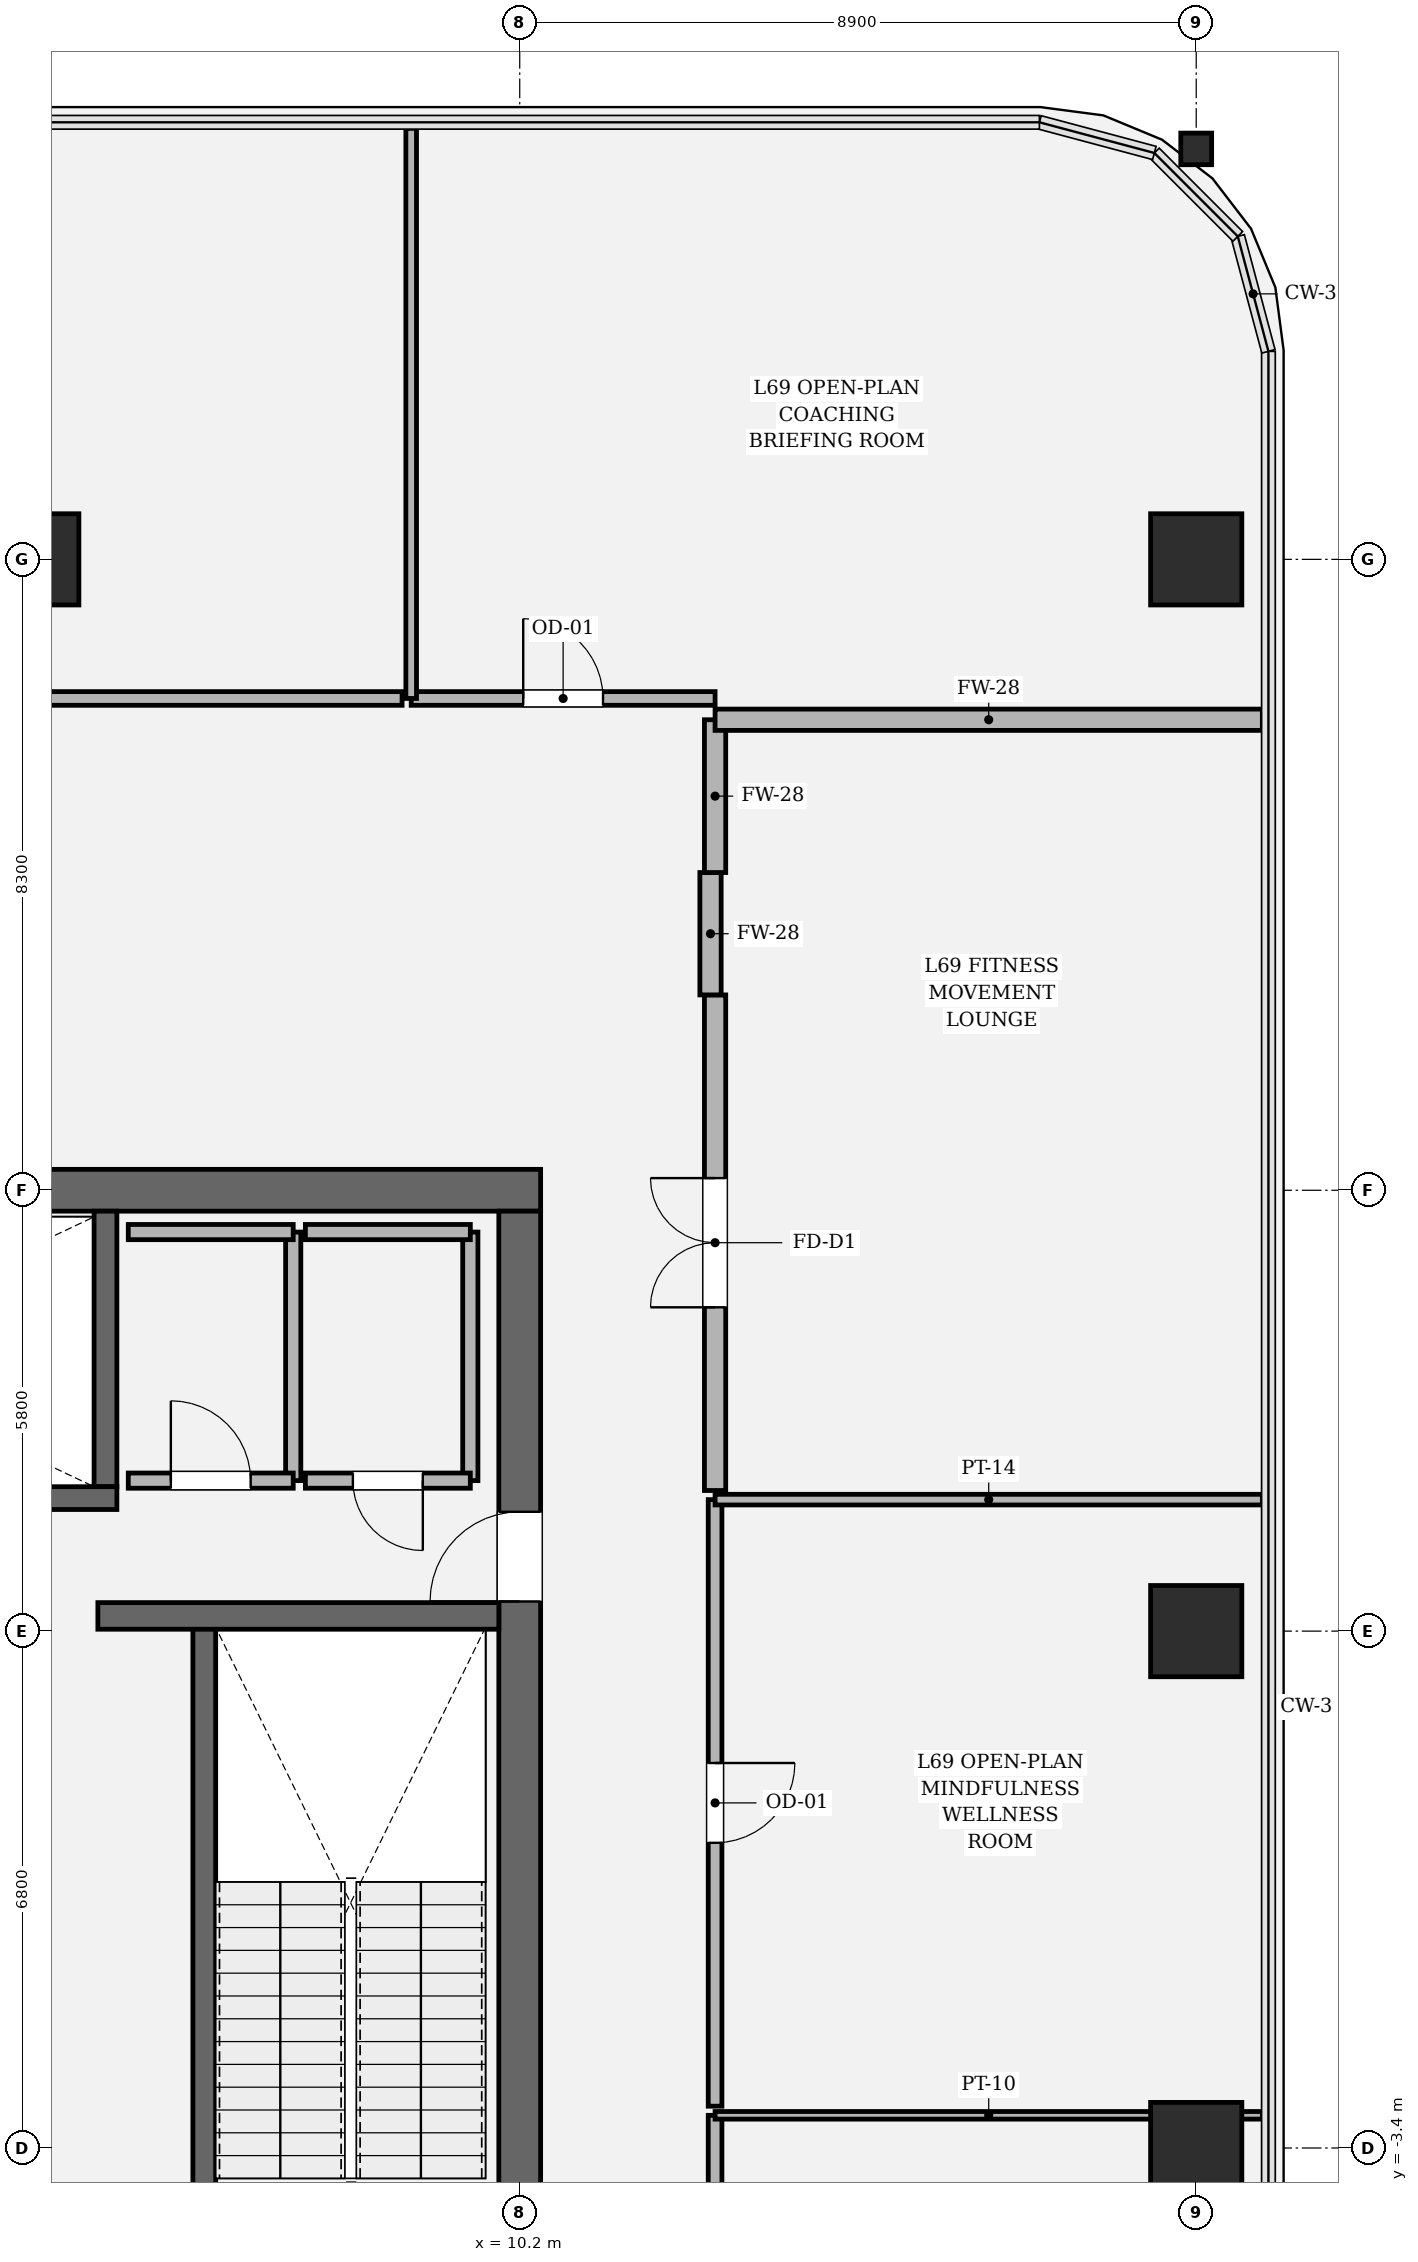
"""IFC4 building model, lengths in metres.
Left out: names, types, materials, properties, quantities, classifications, styles, units other than length and angle.
Written with IfcOpenShell. Run it as: python <this file> out.ifc"""

import sys

from ifc_helpers import new_model, si_unit, direction, frame, frame_2d, origin, origin_2d, place, context, subcontext, project, spatial, rectangle, hollow_rectangle, i_section, extrude, element, fill, save


model = new_model("IFC4")
c1 = context("Model", 3, precision=1e-05, world=origin(), true_north=direction((0.0, 1.0)))
c2 = subcontext(c1, "Body", "Model", "MODEL_VIEW")
j1 = project(units=[si_unit("LENGTHUNIT", "METRE"), si_unit("PLANEANGLEUNIT", "RADIAN")], contexts=[c1])
p1 = place(None, origin())
s1 = spatial("IfcSite", under=j1, at=p1, CompositionType="ELEMENT")
p2 = place(p1, origin())
s2 = spatial("IfcBuilding", under=s1, at=p2, CompositionType="ELEMENT")
p3 = place(p2, frame((0.0, 0.0, 292.2)))
s3 = spatial("IfcBuildingStorey", under=s2, at=p3, CompositionType="ELEMENT", Elevation=292.2)
p4 = place(p3, frame((-10.475, 9.2, 0.0), z_axis=(0.0, 0.0, 1.0), x_axis=(1.0, 0.0, 0.0)))
e1 = element("IfcWall", 1, at=p4, inside=s3, PredefinedType="SHEAR", context=c2, shape_type="SweptSolid", body=[
    extrude(rectangle(XDim=20.95, YDim=0.55, at=frame_2d((10.475, 0.0))), origin(), (0.0, 0.0, 1.0), 4.2),
])
p5 = place(p3, frame((10.2, 8.925, 0.0), z_axis=(0.0, 0.0, 1.0), x_axis=(0.0, -1.0, 0.0)))
e2 = element("IfcWall", 2, at=p5, inside=s3, PredefinedType="SHEAR", context=c2, shape_type="SweptSolid", body=[
    extrude(rectangle(XDim=17.85, YDim=0.55, at=frame_2d((8.925, 0.0))), origin(), (0.0, 0.0, 1.0), 4.2),
])
p6 = place(p5, frame((3.955, 0.0, 0.0)))
e3 = element("IfcOpeningElement", 3, at=p6, cuts=e2, PredefinedType="OPENING", context=c2, shape_type="SweptSolid", body=[
    extrude(rectangle(XDim=1.18, YDim=2.2, at=frame_2d((0.59, 1.1))), frame((0.0, 0.285, 0.0), z_axis=(0.0, -1.0, 0.0), x_axis=(1.0, 0.0, 0.0)), (0.0, 0.0, 1.0), 0.57),
])
p7 = place(p3, frame((6.05, 3.45, 0.0), z_axis=(0.0, 0.0, 1.0), x_axis=(0.0, -1.0, 0.0)))
e4 = element("IfcWall", 4, at=p7, inside=s3, PredefinedType="SOLIDWALL", context=c2, shape_type="SweptSolid", body=[
    extrude(rectangle(XDim=8.95, YDim=0.3, at=frame_2d((4.475, 0.0))), origin(), (0.0, 0.0, 1.0), 4.2),
])
p8 = place(p3, frame((4.75, 8.925, 0.0), z_axis=(0.0, 0.0, 1.0), x_axis=(0.0, -1.0, 0.0)))
e5 = element("IfcWall", 5, at=p8, inside=s3, PredefinedType="SOLIDWALL", context=c2, shape_type="SweptSolid", body=[
    extrude(rectangle(XDim=3.625, YDim=0.3, at=frame_2d((1.812, 0.0))), origin(), (0.0, 0.0, 1.0), 4.2),
])
p9 = place(p3, frame((-4.9, 5.15, 0.0), z_axis=(0.0, 0.0, 1.0), x_axis=(1.0, 0.0, 0.0)))
e6 = element("IfcWall", 6, at=p9, inside=s3, PredefinedType="SOLIDWALL", context=c2, shape_type="SweptSolid", body=[
    extrude(rectangle(XDim=9.8, YDim=0.3, at=frame_2d((4.9, 0.0))), origin(), (0.0, 0.0, 1.0), 4.2),
])
p10 = place(p9, frame((0.56, 0.0, 0.0)))
e7 = element("IfcOpeningElement", 7, at=p10, cuts=e6, PredefinedType="OPENING", context=c2, shape_type="SweptSolid", body=[
    extrude(rectangle(XDim=1.18, YDim=2.2, at=frame_2d((0.59, 1.1))), frame((0.0, 0.16, 0.0), z_axis=(0.0, -1.0, 0.0), x_axis=(1.0, 0.0, 0.0)), (0.0, 0.0, 1.0), 0.32),
])
p11 = place(p3, frame((4.65, 3.6, 0.0), z_axis=(0.0, 0.0, 1.0), x_axis=(1.0, 0.0, 0.0)))
e8 = element("IfcWall", 8, at=p11, inside=s3, PredefinedType="SOLIDWALL", context=c2, shape_type="SweptSolid", body=[
    extrude(rectangle(XDim=5.275, YDim=0.35, at=frame_2d((2.638, 0.0))), origin(), (0.0, 0.0, 1.0), 4.2),
])
for number, where, z_axis, x_axis in (
    (9, (19.1, -3.4, 0.0), (0.0, 0.0, 1.0), (1.0, 0.0, 0.0)),
    (10, (19.1, 3.4, 0.0), (0.0, 0.0, 1.0), (1.0, 0.0, 0.0)),
    (11, (19.1, 17.5, 0.0), (0.0, 0.0, 1.0), (1.0, 0.0, 0.0)),
    (12, (3.8, 17.5, 0.0), (0.0, 0.0, 1.0), (1.0, 0.0, 0.0)),
):
    element("IfcColumn", number, at=place(p3, frame(where, z_axis=z_axis, x_axis=x_axis)), inside=s3, PredefinedType="COLUMN", context=c2, shape_type="SweptSolid", body=[
        extrude(hollow_rectangle(XDim=1.2, YDim=1.2, WallThickness=0.035, at=origin_2d()), origin(), (0.0, 0.0, 1.0), 4.2),
    ])
p12 = place(p3, frame((19.1, 22.9, 0.0), z_axis=(0.0, 0.0, 1.0), x_axis=(1.0, 0.0, 0.0)))
e13 = element("IfcColumn", 13, at=p12, inside=s3, PredefinedType="COLUMN", context=c2, shape_type="SweptSolid", body=[
    extrude(i_section(OverallWidth=0.406, OverallDepth=0.416, WebThickness=0.029, FlangeThickness=0.048, FilletRadius=0.018, at=origin_2d()), origin(), (0.0, 0.0, 1.0), 4.198),
])
p13 = place(p3, frame((7.22, 5.38, 0.0), z_axis=(0.0, 0.0, 1.0), x_axis=(0.0, 1.0, 0.0)))
e14 = element("IfcWall", 14, at=p13, inside=s3, PredefinedType="SOLIDWALL", context=c2, shape_type="SweptSolid", body=[
    extrude(rectangle(XDim=3.27, YDim=0.2, at=frame_2d((1.635, 0.0))), origin(), (0.0, 0.0, 1.0), 4.0),
])
p14 = place(p3, frame((7.22, 8.65, 0.0), z_axis=(0.0, 0.0, 1.0), x_axis=(-1.0, 0.0, 0.0)))
e15 = element("IfcWall", 15, at=p14, inside=s3, PredefinedType="SOLIDWALL", context=c2, shape_type="SweptSolid", body=[
    extrude(rectangle(XDim=2.17, YDim=0.2, at=frame_2d((1.085, 0.0))), origin(), (0.0, 0.0, 1.0), 4.0),
])
p15 = place(p3, frame((5.05, 5.38, 0.0), z_axis=(0.0, 0.0, 1.0), x_axis=(1.0, 0.0, 0.0)))
e16 = element("IfcWall", 16, at=p15, inside=s3, PredefinedType="SOLIDWALL", context=c2, shape_type="SweptSolid", body=[
    extrude(rectangle(XDim=2.17, YDim=0.2, at=frame_2d((1.085, 0.0))), origin(), (0.0, 0.0, 1.0), 4.0),
])
p16 = place(p15, frame((0.56, 0.0, 0.0)))
e17 = element("IfcOpeningElement", 17, at=p16, cuts=e16, PredefinedType="OPENING", context=c2, shape_type="SweptSolid", body=[
    extrude(rectangle(XDim=1.05, YDim=2.2, at=frame_2d((0.525, 1.1))), frame((0.0, 0.11, 0.0), z_axis=(0.0, -1.0, 0.0), x_axis=(1.0, 0.0, 0.0)), (0.0, 0.0, 1.0), 0.22),
])
p17 = place(p3, frame((9.55, 5.38, 0.0), z_axis=(0.0, 0.0, 1.0), x_axis=(0.0, 1.0, 0.0)))
e18 = element("IfcWall", 18, at=p17, inside=s3, PredefinedType="SOLIDWALL", context=c2, shape_type="SweptSolid", body=[
    extrude(rectangle(XDim=3.27, YDim=0.2, at=frame_2d((1.635, 0.0))), origin(), (0.0, 0.0, 1.0), 4.0),
])
p18 = place(p3, frame((9.55, 8.65, 0.0), z_axis=(0.0, 0.0, 1.0), x_axis=(-1.0, 0.0, 0.0)))
e19 = element("IfcWall", 19, at=p18, inside=s3, PredefinedType="SOLIDWALL", context=c2, shape_type="SweptSolid", body=[
    extrude(rectangle(XDim=2.17, YDim=0.2, at=frame_2d((1.085, 0.0))), origin(), (0.0, 0.0, 1.0), 4.0),
])
p19 = place(p3, frame((7.38, 5.38, 0.0), z_axis=(0.0, 0.0, 1.0), x_axis=(1.0, 0.0, 0.0)))
e20 = element("IfcWall", 20, at=p19, inside=s3, PredefinedType="SOLIDWALL", context=c2, shape_type="SweptSolid", body=[
    extrude(rectangle(XDim=2.17, YDim=0.2, at=frame_2d((1.085, 0.0))), origin(), (0.0, 0.0, 1.0), 4.0),
])
p20 = place(p19, frame((0.625, 0.0, 0.0)))
e21 = element("IfcOpeningElement", 21, at=p20, cuts=e20, PredefinedType="OPENING", context=c2, shape_type="SweptSolid", body=[
    extrude(rectangle(XDim=0.92, YDim=2.1, at=frame_2d((0.46, 1.05))), frame((0.0, 0.11, 0.0), z_axis=(0.0, -1.0, 0.0), x_axis=(1.0, 0.0, 0.0)), (0.0, 0.0, 1.0), 0.22),
])
p21 = place(p3, frame((12.77, -11.49, 0.0), z_axis=(0.0, 0.0, 1.0), x_axis=(0.0, 1.0, 0.0)))
e22 = element("IfcWall", 22, at=p21, inside=s3, PredefinedType="PARTITIONING", context=c2, shape_type="SweptSolid", body=[
    extrude(rectangle(XDim=8.52, YDim=0.18, at=frame_2d((4.26, 0.0))), origin(), (0.0, 0.0, 1.0), 3.394),
])
p22 = place(p21, frame((3.75, 0.0, 0.0)))
e23 = element("IfcOpeningElement", 23, at=p22, cuts=e22, PredefinedType="OPENING", context=c2, shape_type="SweptSolid", body=[
    extrude(rectangle(XDim=1.02, YDim=2.2, at=frame_2d((0.51, 1.1))), frame((0.0, 0.1, 0.0), z_axis=(0.0, -1.0, 0.0), x_axis=(1.0, 0.0, 0.0)), (0.0, 0.0, 1.0), 0.2),
])
p23 = place(p3, frame((12.77, -2.97, 0.0), z_axis=(0.0, 0.0, 1.0), x_axis=(1.0, 0.0, 0.0)))
e24 = element("IfcWall", 24, at=p23, inside=s3, PredefinedType="PARTITIONING", context=c2, shape_type="SweptSolid", body=[
    extrude(rectangle(XDim=7.2, YDim=0.1, at=frame_2d((3.6, 0.0))), origin(), (0.0, 0.0, 1.0), 3.394),
])
p24 = place(p3, frame((12.77, -2.85, 0.0), z_axis=(0.0, 0.0, 1.0), x_axis=(0.0, 1.0, 0.0)))
e25 = element("IfcWall", 25, at=p24, inside=s3, PredefinedType="PARTITIONING", context=c2, shape_type="SweptSolid", body=[
    extrude(rectangle(XDim=7.98, YDim=0.18, at=frame_2d((3.99, 0.0))), origin(), (0.0, 0.0, 1.0), 3.394),
])
p25 = place(p24, frame((3.465, 0.0, 0.0)))
e26 = element("IfcOpeningElement", 26, at=p25, cuts=e25, PredefinedType="OPENING", context=c2, shape_type="SweptSolid", body=[
    extrude(rectangle(XDim=1.05, YDim=2.2, at=frame_2d((0.525, 1.1))), frame((0.0, 0.1, 0.0), z_axis=(0.0, -1.0, 0.0), x_axis=(1.0, 0.0, 0.0)), (0.0, 0.0, 1.0), 0.2),
])
p26 = place(p3, frame((12.77, 5.13, 0.0), z_axis=(0.0, 0.0, 1.0), x_axis=(1.0, 0.0, 0.0)))
e27 = element("IfcWall", 27, at=p26, inside=s3, PredefinedType="PARTITIONING", context=c2, shape_type="SweptSolid", body=[
    extrude(rectangle(XDim=7.2, YDim=0.14, at=frame_2d((3.6, 0.0))), origin(), (0.0, 0.0, 1.0), 3.394),
])
p27 = place(p3, frame((12.77, 5.25, 0.0), z_axis=(0.0, 0.0, 1.0), x_axis=(0.0, 1.0, 0.0)))
e28 = element("IfcWall", 28, at=p27, inside=s3, PredefinedType="SOLIDWALL", context=c2, shape_type="SweptSolid", body=[
    extrude(rectangle(XDim=6.52, YDim=0.28, at=frame_2d((3.26, 0.0))), origin(), (0.0, 0.0, 1.0), 3.394),
])
p28 = place(p27, frame((2.41, 0.0, 0.0)))
e29 = element("IfcOpeningElement", 29, at=p28, cuts=e28, PredefinedType="OPENING", context=c2, shape_type="SweptSolid", body=[
    extrude(rectangle(XDim=1.7, YDim=2.3, at=frame_2d((0.85, 1.15))), frame((0.0, 0.15, 0.0), z_axis=(0.0, -1.0, 0.0), x_axis=(1.0, 0.0, 0.0)), (0.0, 0.0, 1.0), 0.3),
])
p29 = place(p3, frame((12.71, 11.77, 0.0), z_axis=(0.0, 0.0, 1.0), x_axis=(0.0, 1.0, 0.0)))
e30 = element("IfcWall", 30, at=p29, inside=s3, PredefinedType="SOLIDWALL", context=c2, shape_type="SweptSolid", body=[
    extrude(rectangle(XDim=1.61, YDim=0.28, at=frame_2d((0.805, 0.0))), origin(), (0.0, 0.0, 1.0), 3.634),
])
p30 = place(p3, frame((12.77, 13.38, 0.0), z_axis=(0.0, 0.0, 1.0), x_axis=(0.0, 1.0, 0.0)))
e31 = element("IfcWall", 31, at=p30, inside=s3, PredefinedType="SOLIDWALL", context=c2, shape_type="SweptSolid", body=[
    extrude(rectangle(XDim=2.01, YDim=0.28, at=frame_2d((1.005, 0.0))), origin(), (0.0, 0.0, 1.0), 3.634),
])
p31 = place(p3, frame((12.77, 15.39, 0.0), z_axis=(0.0, 0.0, 1.0), x_axis=(1.0, 0.0, 0.0)))
e32 = element("IfcWall", 32, at=p31, inside=s3, PredefinedType="SOLIDWALL", context=c2, shape_type="SweptSolid", body=[
    extrude(rectangle(XDim=7.2, YDim=0.28, at=frame_2d((3.6, 0.0))), origin(), (0.0, 0.0, 1.0), 3.394),
])
p32 = place(p3, frame((12.77, 15.67, 0.0), z_axis=(0.0, 0.0, 1.0), x_axis=(-1.0, 0.0, 0.0)))
e33 = element("IfcWall", 33, at=p32, inside=s3, PredefinedType="PARTITIONING", context=c2, shape_type="SweptSolid", body=[
    extrude(rectangle(XDim=3.998, YDim=0.18, at=frame_2d((1.999, 0.0))), origin(), (0.0, 0.0, 1.0), 3.394),
])
p33 = place(p32, frame((1.474, 0.0, 0.0)))
e34 = element("IfcOpeningElement", 34, at=p33, cuts=e33, PredefinedType="OPENING", context=c2, shape_type="SweptSolid", body=[
    extrude(rectangle(XDim=1.05, YDim=2.2, at=frame_2d((0.525, 1.1))), frame((0.0, 0.1, 0.0), z_axis=(0.0, -1.0, 0.0), x_axis=(1.0, 0.0, 0.0)), (0.0, 0.0, 1.0), 0.2),
])
p34 = place(p3, frame((8.772, 15.67, 0.0), z_axis=(0.0, 0.0, 1.0), x_axis=(0.0, 1.0, 0.0)))
e35 = element("IfcWall", 35, at=p34, inside=s3, PredefinedType="PARTITIONING", context=c2, shape_type="SweptSolid", body=[
    extrude(rectangle(XDim=7.5, YDim=0.14, at=frame_2d((3.75, 0.0))), origin(), (0.0, 0.0, 1.0), 2.714),
])
p35 = place(p3, frame((8.652, 15.67, 0.0), z_axis=(0.0, 0.0, 1.0), x_axis=(-1.0, 0.0, 0.0)))
e36 = element("IfcWall", 36, at=p35, inside=s3, PredefinedType="PARTITIONING", context=c2, shape_type="SweptSolid", body=[
    extrude(rectangle(XDim=16.052, YDim=0.18, at=frame_2d((8.026, 0.0))), origin(), (0.0, 0.0, 1.0), 3.394),
])
p36 = place(p6, origin())
e37 = element("IfcDoor", 37, at=p36, inside=s3, OperationType="SINGLE_SWING_RIGHT", PredefinedType="DOOR", context=c2, shape_type="SweptSolid", body=[
    extrude(rectangle(XDim=1.18, YDim=2.2, at=frame_2d((0.59, 1.1))), frame((0.0, 0.025, 0.0), z_axis=(0.0, -1.0, 0.0), x_axis=(1.0, 0.0, 0.0)), (0.0, 0.0, 1.0), 0.05),
])
fill(e3, e37)
p37 = place(p16, origin())
e38 = element("IfcDoor", 38, at=p37, inside=s3, OperationType="SINGLE_SWING_LEFT", PredefinedType="DOOR", context=c2, shape_type="SweptSolid", body=[
    extrude(rectangle(XDim=1.05, YDim=2.2, at=frame_2d((0.525, 1.1))), frame((0.0, 0.025, 0.0), z_axis=(0.0, -1.0, 0.0), x_axis=(1.0, 0.0, 0.0)), (0.0, 0.0, 1.0), 0.05),
])
fill(e17, e38)
p38 = place(p20, origin())
e39 = element("IfcDoor", 39, at=p38, inside=s3, OperationType="SINGLE_SWING_RIGHT", PredefinedType="DOOR", context=c2, shape_type="SweptSolid", body=[
    extrude(rectangle(XDim=0.92, YDim=2.1, at=frame_2d((0.46, 1.05))), frame((0.0, 0.025, 0.0), z_axis=(0.0, -1.0, 0.0), x_axis=(1.0, 0.0, 0.0)), (0.0, 0.0, 1.0), 0.05),
])
fill(e21, e39)
p39 = place(p25, origin())
e40 = element("IfcDoor", 40, at=p39, inside=s3, OperationType="SINGLE_SWING_RIGHT", PredefinedType="DOOR", context=c2, shape_type="SweptSolid", body=[
    extrude(rectangle(XDim=1.05, YDim=2.2, at=frame_2d((0.525, 1.1))), frame((0.0, 0.025, 0.0), z_axis=(0.0, -1.0, 0.0), x_axis=(1.0, 0.0, 0.0)), (0.0, 0.0, 1.0), 0.05),
])
fill(e26, e40)
p40 = place(p28, origin())
e41 = element("IfcDoor", 41, at=p40, inside=s3, OperationType="DOUBLE_DOOR_SINGLE_SWING", PredefinedType="DOOR", context=c2, shape_type="SweptSolid", body=[
    extrude(rectangle(XDim=1.7, YDim=2.3, at=frame_2d((0.85, 1.15))), frame((0.0, 0.025, 0.0), z_axis=(0.0, -1.0, 0.0), x_axis=(1.0, 0.0, 0.0)), (0.0, 0.0, 1.0), 0.05),
])
fill(e29, e41)
p41 = place(p33, origin())
e42 = element("IfcDoor", 42, at=p41, inside=s3, OperationType="SINGLE_SWING_RIGHT", PredefinedType="DOOR", context=c2, shape_type="SweptSolid", body=[
    extrude(rectangle(XDim=1.05, YDim=2.2, at=frame_2d((0.525, 1.1))), frame((0.0, 0.025, 0.0), z_axis=(0.0, -1.0, 0.0), x_axis=(1.0, 0.0, 0.0)), (0.0, 0.0, 1.0), 0.05),
])
fill(e34, e42)
save(model, sys.argv[1])
